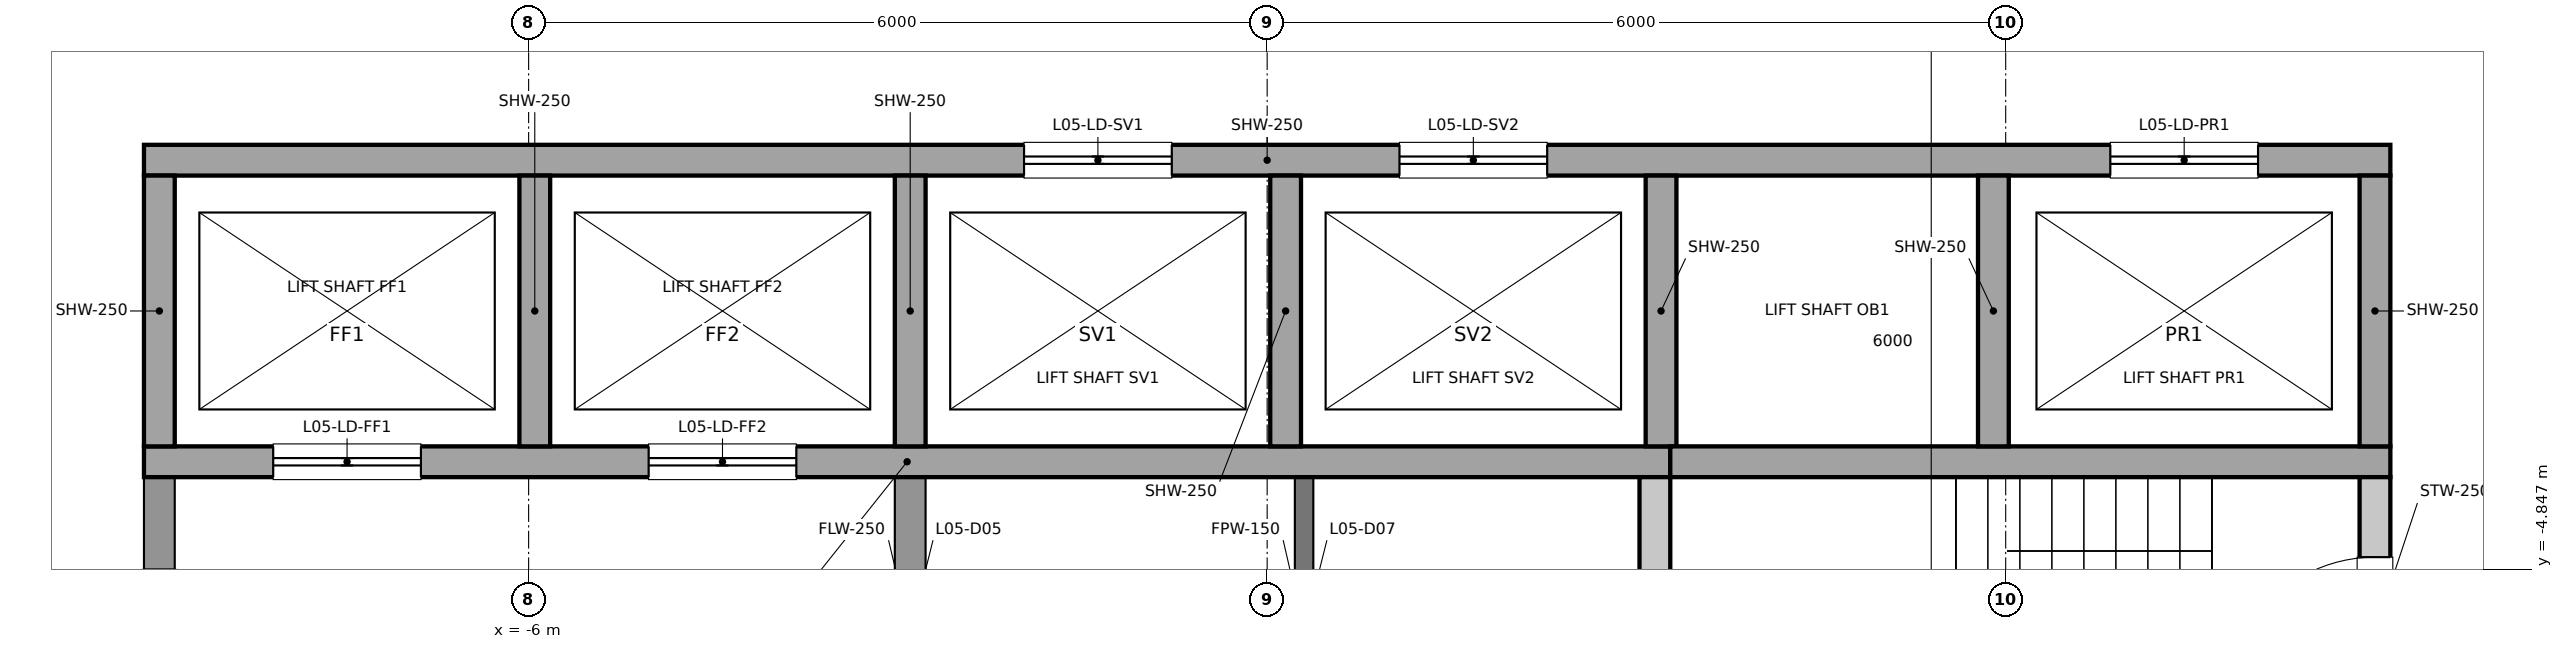
"""IFC4 building model, lengths in metres.
Left out: names, types, materials, properties, quantities, classifications, styles, units other than length and angle.
Written with IfcOpenShell. Run it as: python <this file> out.ifc"""

import sys

from ifc_helpers import new_model, si_unit, direction, frame, frame_2d, origin, place, context, subcontext, project, spatial, rectangle, extrude, element, fill, save


model = new_model("IFC4")
c1 = context("Model", 3, precision=1e-05, world=origin(), true_north=direction((0.0, 1.0)))
c2 = subcontext(c1, "Body", "Model", "MODEL_VIEW")
j1 = project(units=[si_unit("LENGTHUNIT", "METRE"), si_unit("PLANEANGLEUNIT", "RADIAN")], contexts=[c1])
p1 = place(None, origin())
s1 = spatial("IfcSite", under=j1, at=p1, CompositionType="ELEMENT")
p2 = place(p1, origin())
s2 = spatial("IfcBuilding", under=s1, at=p2, CompositionType="ELEMENT")
p3 = place(p2, frame((0.0, 0.0, 37.4)))
s3 = spatial("IfcBuildingStorey", under=s2, at=p3, CompositionType="ELEMENT", Elevation=37.4)
p4 = place(p3, frame((0.3, -6.6, 0.0), z_axis=(0.0, 0.0, 1.0), x_axis=(0.0, 1.0, 0.0)))
e1 = element("IfcWall", 1, at=p4, inside=s3, PredefinedType="PARTITIONING", context=c2, shape_type="SweptSolid", body=[
    extrude(rectangle(XDim=2.5, YDim=0.15, at=frame_2d((1.25, 0.0))), origin(), (0.0, 0.0, 1.0), 6.25),
])
p5 = place(p4, frame((0.8, 0.0, 0.0)))
e2 = element("IfcOpeningElement", 2, at=p5, cuts=e1, PredefinedType="OPENING", context=c2, shape_type="SweptSolid", body=[
    extrude(rectangle(XDim=0.9, YDim=2.1, at=frame_2d((0.45, 1.05))), frame((0.0, 0.075, 0.0), z_axis=(0.0, -1.0, 0.0), x_axis=(1.0, 0.0, 0.0)), (0.0, 0.0, 1.0), 0.15),
])
p6 = place(p3, frame((9.0, -6.6, 0.0), z_axis=(0.0, 0.0, 1.0), x_axis=(0.0, 1.0, 0.0)))
e3 = element("IfcWall", 3, at=p6, inside=s3, PredefinedType="SOLIDWALL", context=c2, shape_type="SweptSolid", body=[
    extrude(rectangle(XDim=2.5, YDim=0.25, at=frame_2d((1.25, 0.0))), origin(), (0.0, 0.0, 1.0), 6.25),
])
p7 = place(p6, frame((0.65, 0.0, 0.0)))
e4 = element("IfcOpeningElement", 4, at=p7, cuts=e3, PredefinedType="OPENING", context=c2, shape_type="SweptSolid", body=[
    extrude(rectangle(XDim=1.2, YDim=2.1, at=frame_2d((0.6, 1.05))), frame((0.0, 0.125, 0.0), z_axis=(0.0, -1.0, 0.0), x_axis=(1.0, 0.0, 0.0)), (0.0, 0.0, 1.0), 0.25),
])
p8 = place(p3, frame((-9.0, -6.6, 0.0), z_axis=(0.0, 0.0, 1.0), x_axis=(0.0, 1.0, 0.0)))
e5 = element("IfcWall", 5, at=p8, inside=s3, PredefinedType="PARTITIONING", context=c2, shape_type="SweptSolid", body=[
    extrude(rectangle(XDim=2.5, YDim=0.25, at=frame_2d((1.25, 0.0))), origin(), (0.0, 0.0, 1.0), 6.25),
])
p9 = place(p8, frame((0.75, 0.0, 0.0)))
e6 = element("IfcOpeningElement", 6, at=p9, cuts=e5, PredefinedType="OPENING", context=c2, shape_type="SweptSolid", body=[
    extrude(rectangle(XDim=1.0, YDim=2.1, at=frame_2d((0.5, 1.05))), frame((0.0, 0.125, 0.0), z_axis=(0.0, -1.0, 0.0), x_axis=(1.0, 0.0, 0.0)), (0.0, 0.0, 1.0), 0.25),
])
p10 = place(p3, frame((3.15, -6.6, 0.0), z_axis=(0.0, 0.0, 1.0), x_axis=(0.0, 1.0, 0.0)))
e7 = element("IfcWall", 7, at=p10, inside=s3, PredefinedType="SOLIDWALL", context=c2, shape_type="SweptSolid", body=[
    extrude(rectangle(XDim=2.5, YDim=0.25, at=frame_2d((1.25, 0.0))), origin(), (0.0, 0.0, 1.0), 6.25),
])
p11 = place(p3, frame((-2.9, -6.6, 0.0), z_axis=(0.0, 0.0, 1.0), x_axis=(0.0, 1.0, 0.0)))
e8 = element("IfcWall", 8, at=p11, inside=s3, PredefinedType="PARTITIONING", context=c2, shape_type="SweptSolid", body=[
    extrude(rectangle(XDim=2.5, YDim=0.25, at=frame_2d((1.25, 0.0))), origin(), (0.0, 0.0, 1.0), 6.25),
])
p12 = place(p11, frame((0.8, 0.0, 0.0)))
e9 = element("IfcOpeningElement", 9, at=p12, cuts=e8, PredefinedType="OPENING", context=c2, shape_type="SweptSolid", body=[
    extrude(rectangle(XDim=0.9, YDim=2.1, at=frame_2d((0.45, 1.05))), frame((0.0, 0.125, 0.0), z_axis=(0.0, -1.0, 0.0), x_axis=(1.0, 0.0, 0.0)), (0.0, 0.0, 1.0), 0.25),
])
p13 = place(p3, frame((-9.125, -1.525, 0.0), z_axis=(0.0, 0.0, 1.0), x_axis=(1.0, 0.0, 0.0)))
e10 = element("IfcWall", 10, at=p13, inside=s3, PredefinedType="SOLIDWALL", context=c2, shape_type="SweptSolid", body=[
    extrude(rectangle(XDim=18.25, YDim=0.25, at=frame_2d((9.125, 0.0))), origin(), (0.0, 0.0, 1.0), 6.25),
])
p14 = place(p13, frame((7.15, 0.0, 0.0)))
e11 = element("IfcOpeningElement", 11, at=p14, cuts=e10, PredefinedType="OPENING", context=c2, shape_type="SweptSolid", body=[
    extrude(rectangle(XDim=1.2, YDim=2.1, at=frame_2d((0.6, 1.05))), frame((0.0, 0.125, 0.0), z_axis=(0.0, -1.0, 0.0), x_axis=(1.0, 0.0, 0.0)), (0.0, 0.0, 1.0), 0.25),
])
p15 = place(p13, frame((10.2, 0.0, 0.0)))
e12 = element("IfcOpeningElement", 12, at=p15, cuts=e10, PredefinedType="OPENING", context=c2, shape_type="SweptSolid", body=[
    extrude(rectangle(XDim=1.2, YDim=2.1, at=frame_2d((0.6, 1.05))), frame((0.0, 0.125, 0.0), z_axis=(0.0, -1.0, 0.0), x_axis=(1.0, 0.0, 0.0)), (0.0, 0.0, 1.0), 0.25),
])
p16 = place(p13, frame((15.975, 0.0, 0.0)))
e13 = element("IfcOpeningElement", 13, at=p16, cuts=e10, PredefinedType="OPENING", context=c2, shape_type="SweptSolid", body=[
    extrude(rectangle(XDim=1.2, YDim=2.1, at=frame_2d((0.6, 1.05))), frame((0.0, 0.125, 0.0), z_axis=(0.0, -1.0, 0.0), x_axis=(1.0, 0.0, 0.0)), (0.0, 0.0, 1.0), 0.25),
])
p17 = place(p3, frame((-9.125, -3.975, 0.0), z_axis=(0.0, 0.0, 1.0), x_axis=(1.0, 0.0, 0.0)))
e14 = element("IfcWall", 14, at=p17, inside=s3, PredefinedType="SOLIDWALL", context=c2, shape_type="SweptSolid", body=[
    extrude(rectangle(XDim=12.4, YDim=0.25, at=frame_2d((6.2, 0.0))), origin(), (0.0, 0.0, 1.0), 6.25),
])
p18 = place(p17, frame((1.05, 0.0, 0.0)))
e15 = element("IfcOpeningElement", 15, at=p18, cuts=e14, PredefinedType="OPENING", context=c2, shape_type="SweptSolid", body=[
    extrude(rectangle(XDim=1.2, YDim=2.1, at=frame_2d((0.6, 1.05))), frame((0.0, 0.125, 0.0), z_axis=(0.0, -1.0, 0.0), x_axis=(1.0, 0.0, 0.0)), (0.0, 0.0, 1.0), 0.25),
])
p19 = place(p17, frame((4.1, 0.0, 0.0)))
e16 = element("IfcOpeningElement", 16, at=p19, cuts=e14, PredefinedType="OPENING", context=c2, shape_type="SweptSolid", body=[
    extrude(rectangle(XDim=1.2, YDim=2.1, at=frame_2d((0.6, 1.05))), frame((0.0, 0.125, 0.0), z_axis=(0.0, -1.0, 0.0), x_axis=(1.0, 0.0, 0.0)), (0.0, 0.0, 1.0), 0.25),
])
p20 = place(p3, frame((3.275, -3.975, 0.0), z_axis=(0.0, 0.0, 1.0), x_axis=(1.0, 0.0, 0.0)))
e17 = element("IfcWall", 17, at=p20, inside=s3, PredefinedType="SOLIDWALL", context=c2, shape_type="SweptSolid", body=[
    extrude(rectangle(XDim=5.85, YDim=0.25, at=frame_2d((2.925, 0.0))), origin(), (0.0, 0.0, 1.0), 6.25),
])
for number, where, z_axis, x_axis in (
    (18, (-9.0, -3.85, 0.0), (0.0, 0.0, 1.0), (0.0, 1.0, 0.0)),
    (19, (-5.95, -3.85, 0.0), (0.0, 0.0, 1.0), (0.0, 1.0, 0.0)),
    (20, (-2.9, -3.85, 0.0), (0.0, 0.0, 1.0), (0.0, 1.0, 0.0)),
    (21, (0.15, -3.85, 0.0), (0.0, 0.0, 1.0), (0.0, 1.0, 0.0)),
    (22, (3.2, -3.85, 0.0), (0.0, 0.0, 1.0), (0.0, 1.0, 0.0)),
    (23, (5.9, -3.85, 0.0), (0.0, 0.0, 1.0), (0.0, 1.0, 0.0)),
    (24, (9.0, -3.85, 0.0), (0.0, 0.0, 1.0), (0.0, 1.0, 0.0)),
):
    element("IfcWall", number, at=place(p3, frame(where, z_axis=z_axis, x_axis=x_axis)), inside=s3, PredefinedType="SOLIDWALL", context=c2, shape_type="SweptSolid", body=[
        extrude(rectangle(XDim=2.2, YDim=0.25, at=frame_2d((1.1, 0.0))), origin(), (0.0, 0.0, 1.0), 6.25),
    ])
p21 = place(p18, origin())
e25 = element("IfcDoor", 25, at=p21, inside=s3, OperationType="DOUBLE_DOOR_SLIDING", PredefinedType="DOOR", context=c2, shape_type="SweptSolid", body=[
    extrude(rectangle(XDim=1.2, YDim=2.1, at=frame_2d((0.6, 1.05))), frame((0.0, 0.025, 0.0), z_axis=(0.0, -1.0, 0.0), x_axis=(1.0, 0.0, 0.0)), (0.0, 0.0, 1.0), 0.05),
])
fill(e15, e25)
p22 = place(p19, origin())
e26 = element("IfcDoor", 26, at=p22, inside=s3, OperationType="DOUBLE_DOOR_SLIDING", PredefinedType="DOOR", context=c2, shape_type="SweptSolid", body=[
    extrude(rectangle(XDim=1.2, YDim=2.1, at=frame_2d((0.6, 1.05))), frame((0.0, 0.025, 0.0), z_axis=(0.0, -1.0, 0.0), x_axis=(1.0, 0.0, 0.0)), (0.0, 0.0, 1.0), 0.05),
])
fill(e16, e26)
p23 = place(p14, origin())
e27 = element("IfcDoor", 27, at=p23, inside=s3, OperationType="DOUBLE_DOOR_SLIDING", PredefinedType="DOOR", context=c2, shape_type="SweptSolid", body=[
    extrude(rectangle(XDim=1.2, YDim=2.1, at=frame_2d((0.6, 1.05))), frame((0.0, 0.025, 0.0), z_axis=(0.0, -1.0, 0.0), x_axis=(1.0, 0.0, 0.0)), (0.0, 0.0, 1.0), 0.05),
])
fill(e11, e27)
p24 = place(p15, origin())
e28 = element("IfcDoor", 28, at=p24, inside=s3, OperationType="DOUBLE_DOOR_SLIDING", PredefinedType="DOOR", context=c2, shape_type="SweptSolid", body=[
    extrude(rectangle(XDim=1.2, YDim=2.1, at=frame_2d((0.6, 1.05))), frame((0.0, 0.025, 0.0), z_axis=(0.0, -1.0, 0.0), x_axis=(1.0, 0.0, 0.0)), (0.0, 0.0, 1.0), 0.05),
])
fill(e12, e28)
p25 = place(p16, origin())
e29 = element("IfcDoor", 29, at=p25, inside=s3, OperationType="DOUBLE_DOOR_SLIDING", PredefinedType="DOOR", context=c2, shape_type="SweptSolid", body=[
    extrude(rectangle(XDim=1.2, YDim=2.1, at=frame_2d((0.6, 1.05))), frame((0.0, 0.025, 0.0), z_axis=(0.0, -1.0, 0.0), x_axis=(1.0, 0.0, 0.0)), (0.0, 0.0, 1.0), 0.05),
])
fill(e13, e29)
p26 = place(p7, origin())
e30 = element("IfcDoor", 30, at=p26, inside=s3, OperationType="SINGLE_SWING_LEFT", PredefinedType="DOOR", context=c2, shape_type="SweptSolid", body=[
    extrude(rectangle(XDim=1.2, YDim=2.1, at=frame_2d((0.6, 1.05))), frame((0.0, 0.025, 0.0), z_axis=(0.0, -1.0, 0.0), x_axis=(1.0, 0.0, 0.0)), (0.0, 0.0, 1.0), 0.05),
])
fill(e4, e30)
save(model, sys.argv[1])
